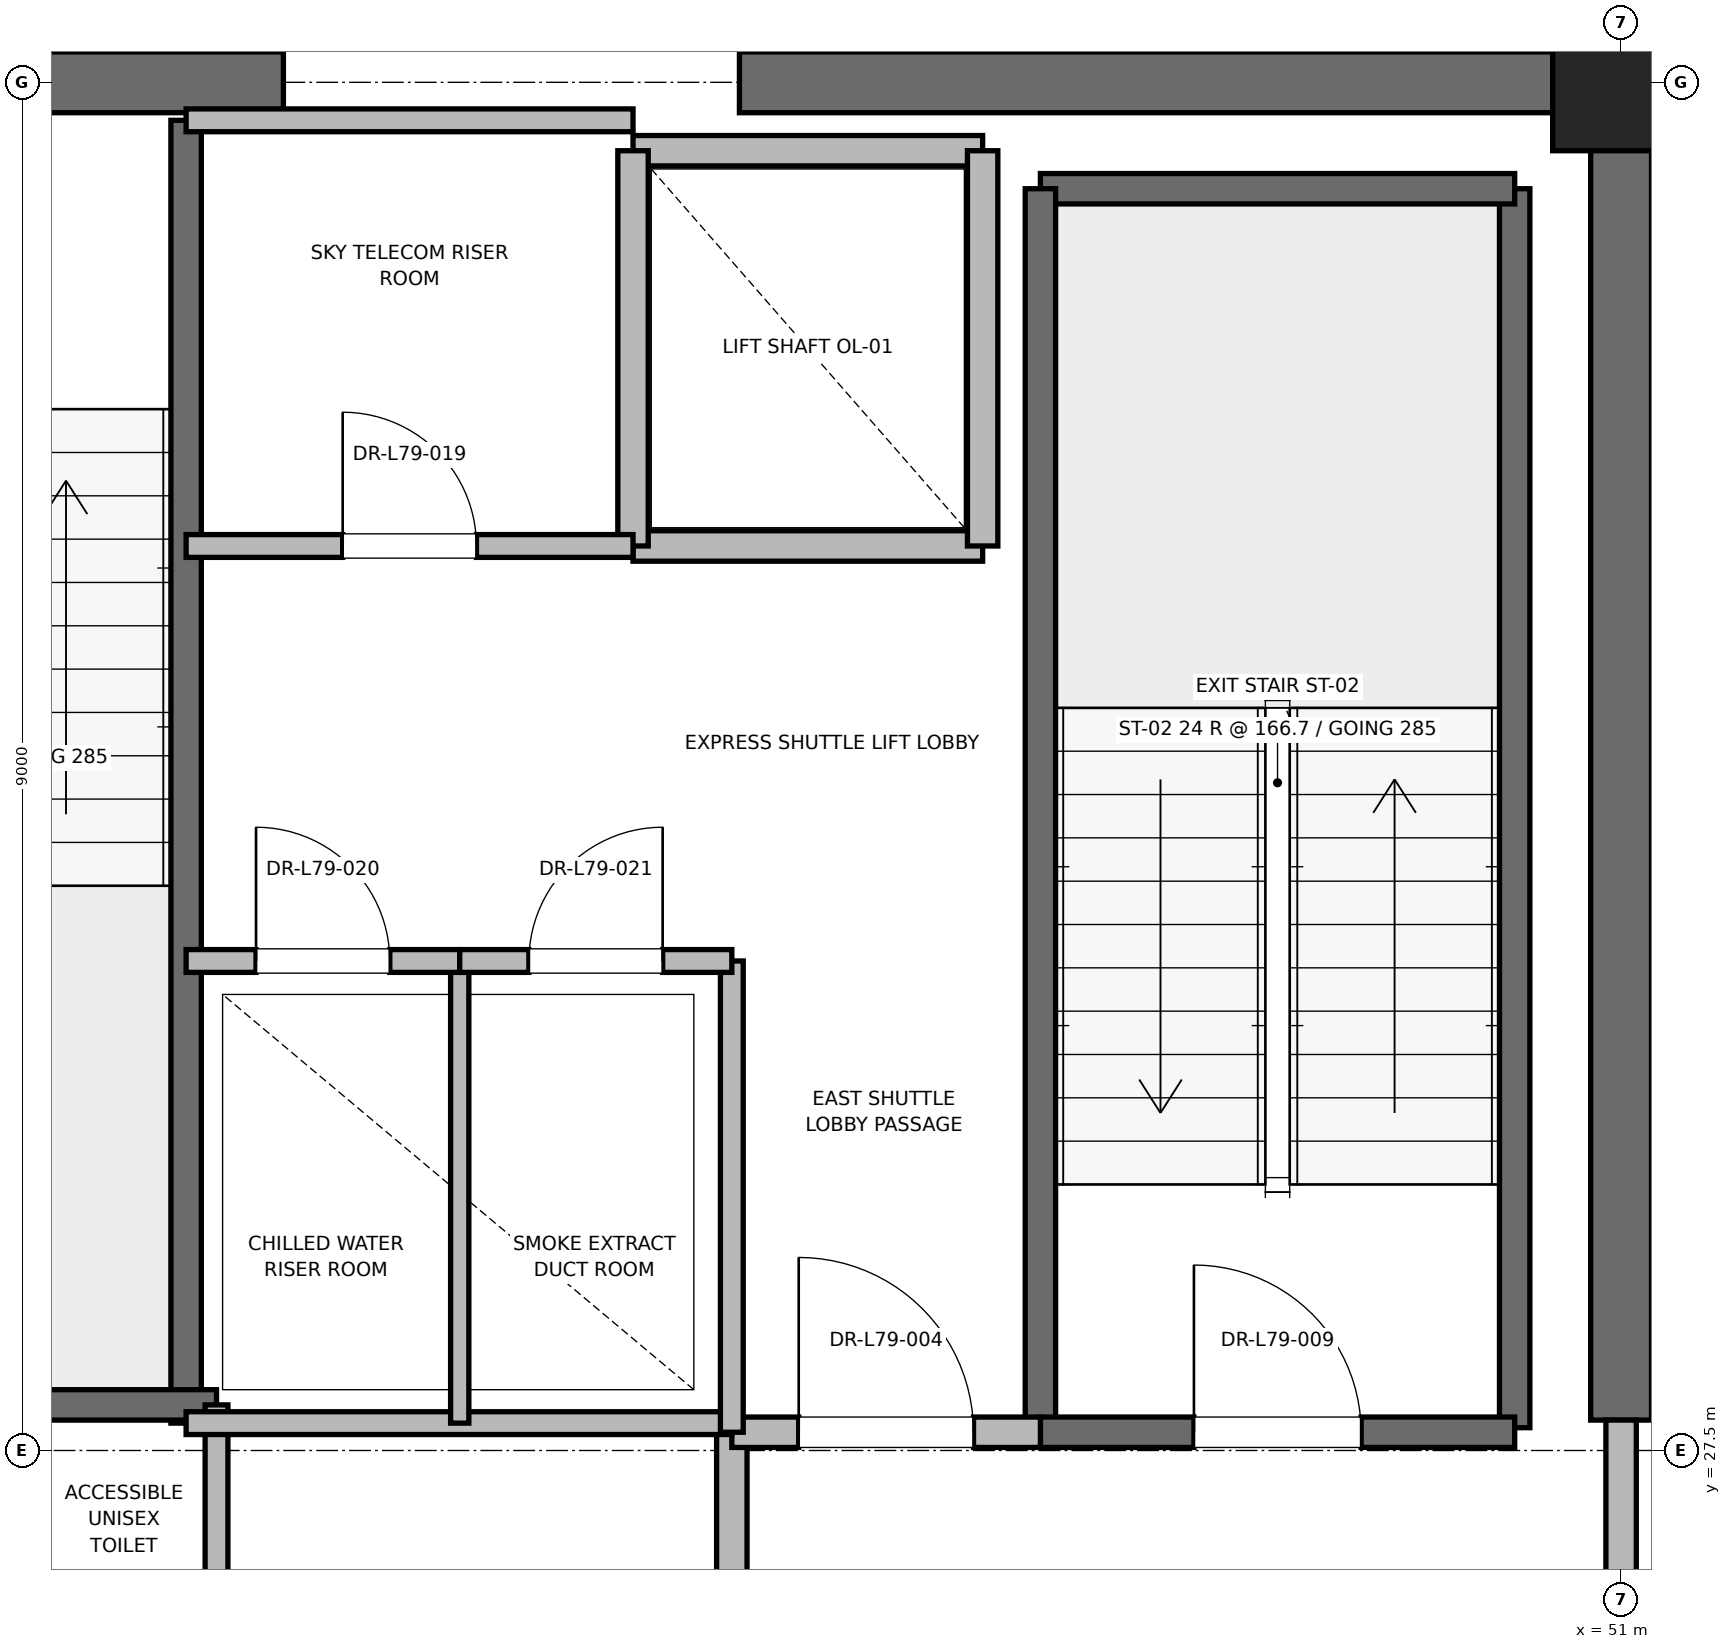
"""IFC4 building model, lengths in metres.
Left out: names, types, materials, properties, quantities, classifications, styles, units other than length and angle.
Written with IfcOpenShell. Run it as: python <this file> out.ifc"""

import sys

from ifc_helpers import new_model, si_unit, direction, frame, frame_2d, origin, origin_2d, place, context, subcontext, project, spatial, rectangle, extrude, element, fill, save


model = new_model("IFC4")
c1 = context("Model", 3, precision=1e-05, world=origin(), true_north=direction((0.0, 1.0)))
c2 = subcontext(c1, "Body", "Model", "MODEL_VIEW")
j1 = project(units=[si_unit("LENGTHUNIT", "METRE"), si_unit("PLANEANGLEUNIT", "RADIAN")], contexts=[c1])
p1 = place(None, origin())
s1 = spatial("IfcSite", under=j1, at=p1, CompositionType="ELEMENT")
p2 = place(p1, origin())
s2 = spatial("IfcBuilding", under=s1, at=p2, CompositionType="ELEMENT")
p3 = place(p2, frame((0.0, 0.0, 338.8)))
s3 = spatial("IfcBuildingStorey", under=s2, at=p3, CompositionType="ELEMENT", Elevation=338.8)
p4 = place(p3, frame((51.0, 36.5, 0.0), z_axis=(0.0, 0.0, 1.0), x_axis=(1.0, 0.0, 0.0)))
e1 = element("IfcColumn", 1, at=p4, inside=s3, PredefinedType="PILASTER", context=c2, shape_type="SweptSolid", body=[
    extrude(rectangle(XDim=0.9, YDim=0.9, at=origin_2d()), origin(), (0.0, 0.0, 1.0), 4.0),
])
p5 = place(p3, frame((37.8, 36.5, 0.0), z_axis=(0.0, 0.0, 1.0), x_axis=(1.0, 0.0, 0.0)))
e2 = element("IfcWall", 2, at=p5, inside=s3, PredefinedType="SHEAR", context=c2, shape_type="SweptSolid", body=[
    extrude(rectangle(XDim=4.4, YDim=0.4, at=frame_2d((2.2, 0.0))), origin(), (0.0, 0.0, 1.0), 3.7),
])
p6 = place(p5, frame((1.65, 0.0, 0.0)))
e3 = element("IfcOpeningElement", 3, at=p6, cuts=e2, PredefinedType="OPENING", context=c2, shape_type="SweptSolid", body=[
    extrude(rectangle(XDim=1.1, YDim=2.15, at=frame_2d((0.55, 1.075))), frame((0.0, 0.2, 0.0), z_axis=(0.0, -1.0, 0.0), x_axis=(1.0, 0.0, 0.0)), (0.0, 0.0, 1.0), 0.4),
])
p7 = place(p3, frame((45.2, 36.5, 0.0), z_axis=(0.0, 0.0, 1.0), x_axis=(1.0, 0.0, 0.0)))
e4 = element("IfcWall", 4, at=p7, inside=s3, PredefinedType="SHEAR", context=c2, shape_type="SweptSolid", body=[
    extrude(rectangle(XDim=5.8, YDim=0.4, at=frame_2d((2.9, 0.0))), origin(), (0.0, 0.0, 1.0), 3.7),
])
p8 = place(p3, frame((51.0, 27.7, 0.0), z_axis=(0.0, 0.0, 1.0), x_axis=(0.0, 1.0, 0.0)))
e5 = element("IfcWall", 5, at=p8, inside=s3, PredefinedType="SHEAR", context=c2, shape_type="SweptSolid", body=[
    extrude(rectangle(XDim=8.8, YDim=0.4, at=frame_2d((4.4, 0.0))), origin(), (0.0, 0.0, 1.0), 3.7),
])
p9 = place(p3, frame((50.3, 27.65, 0.0), z_axis=(0.0, 0.0, 1.0), x_axis=(0.0, 1.0, 0.0)))
e6 = element("IfcWall", 6, at=p9, inside=s3, PredefinedType="SOLIDWALL", context=c2, shape_type="SweptSolid", body=[
    extrude(rectangle(XDim=8.15, YDim=0.2, at=frame_2d((4.075, 0.0))), origin(), (0.0, 0.0, 1.0), 3.7),
])
p10 = place(p3, frame((47.18, 35.8, 0.0), z_axis=(0.0, 0.0, 1.0), x_axis=(1.0, 0.0, 0.0)))
e7 = element("IfcWall", 7, at=p10, inside=s3, PredefinedType="SOLIDWALL", context=c2, shape_type="SweptSolid", body=[
    extrude(rectangle(XDim=3.12, YDim=0.2, at=frame_2d((1.56, 0.0))), origin(), (0.0, 0.0, 1.0), 3.7),
])
p11 = place(p3, frame((47.18, 27.62, 0.0), z_axis=(0.0, 0.0, 1.0), x_axis=(0.0, 1.0, 0.0)))
e8 = element("IfcWall", 8, at=p11, inside=s3, PredefinedType="SOLIDWALL", context=c2, shape_type="SweptSolid", body=[
    extrude(rectangle(XDim=8.18, YDim=0.2, at=frame_2d((4.09, 0.0))), origin(), (0.0, 0.0, 1.0), 3.7),
])
p12 = place(p3, frame((47.18, 27.62, 0.0), z_axis=(0.0, 0.0, 1.0), x_axis=(1.0, 0.0, 0.0)))
e9 = element("IfcWall", 9, at=p12, inside=s3, PredefinedType="SOLIDWALL", context=c2, shape_type="SweptSolid", body=[
    extrude(rectangle(XDim=3.12, YDim=0.2, at=frame_2d((1.56, 0.0))), origin(), (0.0, 0.0, 1.0), 3.7),
])
p13 = place(p12, frame((1.01, 0.0, 0.0)))
e10 = element("IfcOpeningElement", 10, at=p13, cuts=e9, PredefinedType="OPENING", context=c2, shape_type="SweptSolid", body=[
    extrude(rectangle(XDim=1.1, YDim=2.15, at=frame_2d((0.55, 1.075))), frame((0.0, 0.1, 0.0), z_axis=(0.0, -1.0, 0.0), x_axis=(1.0, 0.0, 0.0)), (0.0, 0.0, 1.0), 0.2),
])
p14 = place(p3, frame((41.56, 27.68, 0.0), z_axis=(0.0, 0.0, 1.0), x_axis=(0.0, 1.0, 0.0)))
e11 = element("IfcWall", 11, at=p14, inside=s3, PredefinedType="SOLIDWALL", context=c2, shape_type="SweptSolid", body=[
    extrude(rectangle(XDim=8.57, YDim=0.2, at=frame_2d((4.285, 0.0))), origin(), (0.0, 0.0, 1.0), 3.7),
])
p15 = place(p3, frame((38.44, 27.8, 0.0), z_axis=(0.0, 0.0, 1.0), x_axis=(1.0, 0.0, 0.0)))
e12 = element("IfcWall", 12, at=p15, inside=s3, PredefinedType="SOLIDWALL", context=c2, shape_type="SweptSolid", body=[
    extrude(rectangle(XDim=3.32, YDim=0.2, at=frame_2d((1.66, 0.0))), origin(), (0.0, 0.0, 1.0), 3.7),
])
p16 = place(p3, frame((45.15, 24.25, 0.0), z_axis=(0.0, 0.0, 1.0), x_axis=(0.0, 1.0, 0.0)))
e13 = element("IfcWall", 13, at=p16, inside=s3, PredefinedType="PARTITIONING", context=c2, shape_type="SweptSolid", body=[
    extrude(rectangle(XDim=3.37, YDim=0.2, at=frame_2d((1.685, 0.0))), origin(), (0.0, 0.0, 1.0), 3.7),
])
p17 = place(p3, frame((45.15, 27.62, 0.0), z_axis=(0.0, 0.0, 1.0), x_axis=(1.0, 0.0, 0.0)))
e14 = element("IfcWall", 14, at=p17, inside=s3, PredefinedType="PARTITIONING", context=c2, shape_type="SweptSolid", body=[
    extrude(rectangle(XDim=2.03, YDim=0.2, at=frame_2d((1.015, 0.0))), origin(), (0.0, 0.0, 1.0), 3.7),
])
p18 = place(p17, frame((0.44, 0.0, 0.0)))
e15 = element("IfcOpeningElement", 15, at=p18, cuts=e14, PredefinedType="OPENING", context=c2, shape_type="SweptSolid", body=[
    extrude(rectangle(XDim=1.15, YDim=2.2, at=frame_2d((0.575, 1.1))), frame((0.0, 0.1, 0.0), z_axis=(0.0, -1.0, 0.0), x_axis=(1.0, 0.0, 0.0)), (0.0, 0.0, 1.0), 0.2),
])
p19 = place(p3, frame((51.0, 24.3, 0.0), z_axis=(0.0, 0.0, 1.0), x_axis=(0.0, 1.0, 0.0)))
e16 = element("IfcWall", 16, at=p19, inside=s3, PredefinedType="PARTITIONING", context=c2, shape_type="SweptSolid", body=[
    extrude(rectangle(XDim=3.4, YDim=0.2, at=frame_2d((1.7, 0.0))), origin(), (0.0, 0.0, 1.0), 2.78),
])
p20 = place(p19, frame((1.125, 0.0, 0.0)))
e17 = element("IfcOpeningElement", 17, at=p20, cuts=e16, PredefinedType="OPENING", context=c2, shape_type="SweptSolid", body=[
    extrude(rectangle(XDim=1.15, YDim=2.2, at=frame_2d((0.575, 1.1))), frame((0.0, 0.1, 0.0), z_axis=(0.0, -1.0, 0.0), x_axis=(1.0, 0.0, 0.0)), (0.0, 0.0, 1.0), 0.2),
])
p21 = place(p3, frame((44.5, 33.45, 0.0), z_axis=(0.0, 0.0, 1.0), x_axis=(1.0, 0.0, 0.0)))
e18 = element("IfcWall", 18, at=p21, inside=s3, PredefinedType="SOLIDWALL", context=c2, shape_type="SweptSolid", body=[
    extrude(rectangle(XDim=2.3, YDim=0.2, at=frame_2d((1.15, 0.0))), origin(), (0.0, 0.0, 1.0), 3.7),
])
p22 = place(p3, frame((46.8, 36.05, 0.0), z_axis=(0.0, 0.0, 1.0), x_axis=(-1.0, 0.0, 0.0)))
e19 = element("IfcWall", 19, at=p22, inside=s3, PredefinedType="SOLIDWALL", context=c2, shape_type="SweptSolid", body=[
    extrude(rectangle(XDim=2.3, YDim=0.2, at=frame_2d((1.15, 0.0))), origin(), (0.0, 0.0, 1.0), 2.78),
])
p23 = place(p3, frame((44.5, 36.05, 0.0), z_axis=(0.0, 0.0, 1.0), x_axis=(0.0, -1.0, 0.0)))
e20 = element("IfcWall", 20, at=p23, inside=s3, PredefinedType="SOLIDWALL", context=c2, shape_type="SweptSolid", body=[
    extrude(rectangle(XDim=2.6, YDim=0.2, at=frame_2d((1.3, 0.0))), origin(), (0.0, 0.0, 1.0), 2.78),
])
p24 = place(p3, frame((46.8, 33.45, 0.0), z_axis=(0.0, 0.0, 1.0), x_axis=(0.0, 1.0, 0.0)))
e21 = element("IfcWall", 21, at=p24, inside=s3, PredefinedType="SOLIDWALL", context=c2, shape_type="SweptSolid", body=[
    extrude(rectangle(XDim=2.6, YDim=0.2, at=frame_2d((1.3, 0.0))), origin(), (0.0, 0.0, 1.0), 3.7),
])
p25 = place(p3, frame((41.76, 23.8, 0.0), z_axis=(0.0, 0.0, 1.0), x_axis=(0.0, 1.0, 0.0)))
e22 = element("IfcWall", 22, at=p25, inside=s3, PredefinedType="PARTITIONING", context=c2, shape_type="SweptSolid", body=[
    extrude(rectangle(XDim=4.0, YDim=0.15, at=frame_2d((2.0, 0.0))), origin(), (0.0, 0.0, 1.0), 2.85),
])
p26 = place(p3, frame((41.56, 27.68, 0.0), z_axis=(0.0, 0.0, 1.0), x_axis=(1.0, 0.0, 0.0)))
e23 = element("IfcWall", 23, at=p26, inside=s3, PredefinedType="PARTITIONING", context=c2, shape_type="SweptSolid", body=[
    extrude(rectangle(XDim=3.59, YDim=0.15, at=frame_2d((1.795, 0.0))), origin(), (0.0, 0.0, 1.0), 2.85),
])
p27 = place(p3, frame((45.15, 27.62, 0.0), z_axis=(0.0, 0.0, 1.0), x_axis=(0.0, 1.0, 0.0)))
e24 = element("IfcWall", 24, at=p27, inside=s3, PredefinedType="PARTITIONING", context=c2, shape_type="SweptSolid", body=[
    extrude(rectangle(XDim=3.1, YDim=0.15, at=frame_2d((1.55, 0.0))), origin(), (0.0, 0.0, 1.0), 2.85),
])
p28 = place(p3, frame((43.36, 27.68, 0.0), z_axis=(0.0, 0.0, 1.0), x_axis=(0.0, 1.0, 0.0)))
e25 = element("IfcWall", 25, at=p28, inside=s3, PredefinedType="PARTITIONING", context=c2, shape_type="SweptSolid", body=[
    extrude(rectangle(XDim=3.04, YDim=0.12, at=frame_2d((1.52, 0.0))), origin(), (0.0, 0.0, 1.0), 2.85),
])
p29 = place(p3, frame((41.56, 30.72, 0.0), z_axis=(0.0, 0.0, 1.0), x_axis=(1.0, 0.0, 0.0)))
e26 = element("IfcWall", 26, at=p29, inside=s3, PredefinedType="PARTITIONING", context=c2, shape_type="SweptSolid", body=[
    extrude(rectangle(XDim=1.8, YDim=0.15, at=frame_2d((0.9, 0.0))), origin(), (0.0, 0.0, 1.0), 2.85),
])
p30 = place(p29, frame((0.46, 0.0, 0.0)))
e27 = element("IfcOpeningElement", 27, at=p30, cuts=e26, PredefinedType="OPENING", context=c2, shape_type="SweptSolid", body=[
    extrude(rectangle(XDim=0.88, YDim=2.1, at=frame_2d((0.44, 1.05))), frame((0.0, 0.075, 0.0), z_axis=(0.0, -1.0, 0.0), x_axis=(1.0, 0.0, 0.0)), (0.0, 0.0, 1.0), 0.15),
])
p31 = place(p3, frame((43.36, 30.72, 0.0), z_axis=(0.0, 0.0, 1.0), x_axis=(1.0, 0.0, 0.0)))
e28 = element("IfcWall", 28, at=p31, inside=s3, PredefinedType="PARTITIONING", context=c2, shape_type="SweptSolid", body=[
    extrude(rectangle(XDim=1.79, YDim=0.15, at=frame_2d((0.895, 0.0))), origin(), (0.0, 0.0, 1.0), 2.85),
])
p32 = place(p31, frame((0.455, 0.0, 0.0)))
e29 = element("IfcOpeningElement", 29, at=p32, cuts=e28, PredefinedType="OPENING", context=c2, shape_type="SweptSolid", body=[
    extrude(rectangle(XDim=0.88, YDim=2.1, at=frame_2d((0.44, 1.05))), frame((0.0, 0.075, 0.0), z_axis=(0.0, -1.0, 0.0), x_axis=(1.0, 0.0, 0.0)), (0.0, 0.0, 1.0), 0.15),
])
p33 = place(p3, frame((41.56, 36.25, 0.0), z_axis=(0.0, 0.0, 1.0), x_axis=(1.0, 0.0, 0.0)))
e30 = element("IfcWall", 30, at=p33, inside=s3, PredefinedType="PARTITIONING", context=c2, shape_type="SweptSolid", body=[
    extrude(rectangle(XDim=2.94, YDim=0.15, at=frame_2d((1.47, 0.0))), origin(), (0.0, 0.0, 1.0), 2.78),
])
p34 = place(p3, frame((41.56, 33.45, 0.0), z_axis=(0.0, 0.0, 1.0), x_axis=(1.0, 0.0, 0.0)))
e31 = element("IfcWall", 31, at=p34, inside=s3, PredefinedType="PARTITIONING", context=c2, shape_type="SweptSolid", body=[
    extrude(rectangle(XDim=2.94, YDim=0.15, at=frame_2d((1.47, 0.0))), origin(), (0.0, 0.0, 1.0), 2.85),
])
p35 = place(p34, frame((1.03, 0.0, 0.0)))
e32 = element("IfcOpeningElement", 32, at=p35, cuts=e31, PredefinedType="OPENING", context=c2, shape_type="SweptSolid", body=[
    extrude(rectangle(XDim=0.88, YDim=2.1, at=frame_2d((0.44, 1.05))), frame((0.0, 0.075, 0.0), z_axis=(0.0, -1.0, 0.0), x_axis=(1.0, 0.0, 0.0)), (0.0, 0.0, 1.0), 0.15),
])
p36 = place(p13, origin())
e33 = element("IfcDoor", 33, at=p36, inside=s3, OperationType="SINGLE_SWING_LEFT", PredefinedType="DOOR", context=c2, shape_type="SweptSolid", body=[
    extrude(rectangle(XDim=1.1, YDim=2.15, at=frame_2d((0.55, 1.075))), frame((0.0, 0.025, 0.0), z_axis=(0.0, -1.0, 0.0), x_axis=(1.0, 0.0, 0.0)), (0.0, 0.0, 1.0), 0.05),
])
fill(e10, e33)
p37 = place(p18, origin())
e34 = element("IfcDoor", 34, at=p37, inside=s3, OperationType="SINGLE_SWING_LEFT", PredefinedType="DOOR", context=c2, shape_type="SweptSolid", body=[
    extrude(rectangle(XDim=1.15, YDim=2.2, at=frame_2d((0.575, 1.1))), frame((0.0, 0.025, 0.0), z_axis=(0.0, -1.0, 0.0), x_axis=(1.0, 0.0, 0.0)), (0.0, 0.0, 1.0), 0.05),
])
fill(e15, e34)
p38 = place(p30, origin())
e35 = element("IfcDoor", 35, at=p38, inside=s3, OperationType="SINGLE_SWING_LEFT", PredefinedType="DOOR", context=c2, shape_type="SweptSolid", body=[
    extrude(rectangle(XDim=0.88, YDim=2.1, at=frame_2d((0.44, 1.05))), frame((0.0, 0.025, 0.0), z_axis=(0.0, -1.0, 0.0), x_axis=(1.0, 0.0, 0.0)), (0.0, 0.0, 1.0), 0.05),
])
fill(e27, e35)
p39 = place(p32, origin())
e36 = element("IfcDoor", 36, at=p39, inside=s3, OperationType="SINGLE_SWING_RIGHT", PredefinedType="DOOR", context=c2, shape_type="SweptSolid", body=[
    extrude(rectangle(XDim=0.88, YDim=2.1, at=frame_2d((0.44, 1.05))), frame((0.0, 0.025, 0.0), z_axis=(0.0, -1.0, 0.0), x_axis=(1.0, 0.0, 0.0)), (0.0, 0.0, 1.0), 0.05),
])
fill(e29, e36)
p40 = place(p35, origin())
e37 = element("IfcDoor", 37, at=p40, inside=s3, OperationType="SINGLE_SWING_LEFT", PredefinedType="DOOR", context=c2, shape_type="SweptSolid", body=[
    extrude(rectangle(XDim=0.88, YDim=2.1, at=frame_2d((0.44, 1.05))), frame((0.0, 0.025, 0.0), z_axis=(0.0, -1.0, 0.0), x_axis=(1.0, 0.0, 0.0)), (0.0, 0.0, 1.0), 0.05),
])
fill(e32, e37)
save(model, sys.argv[1])
